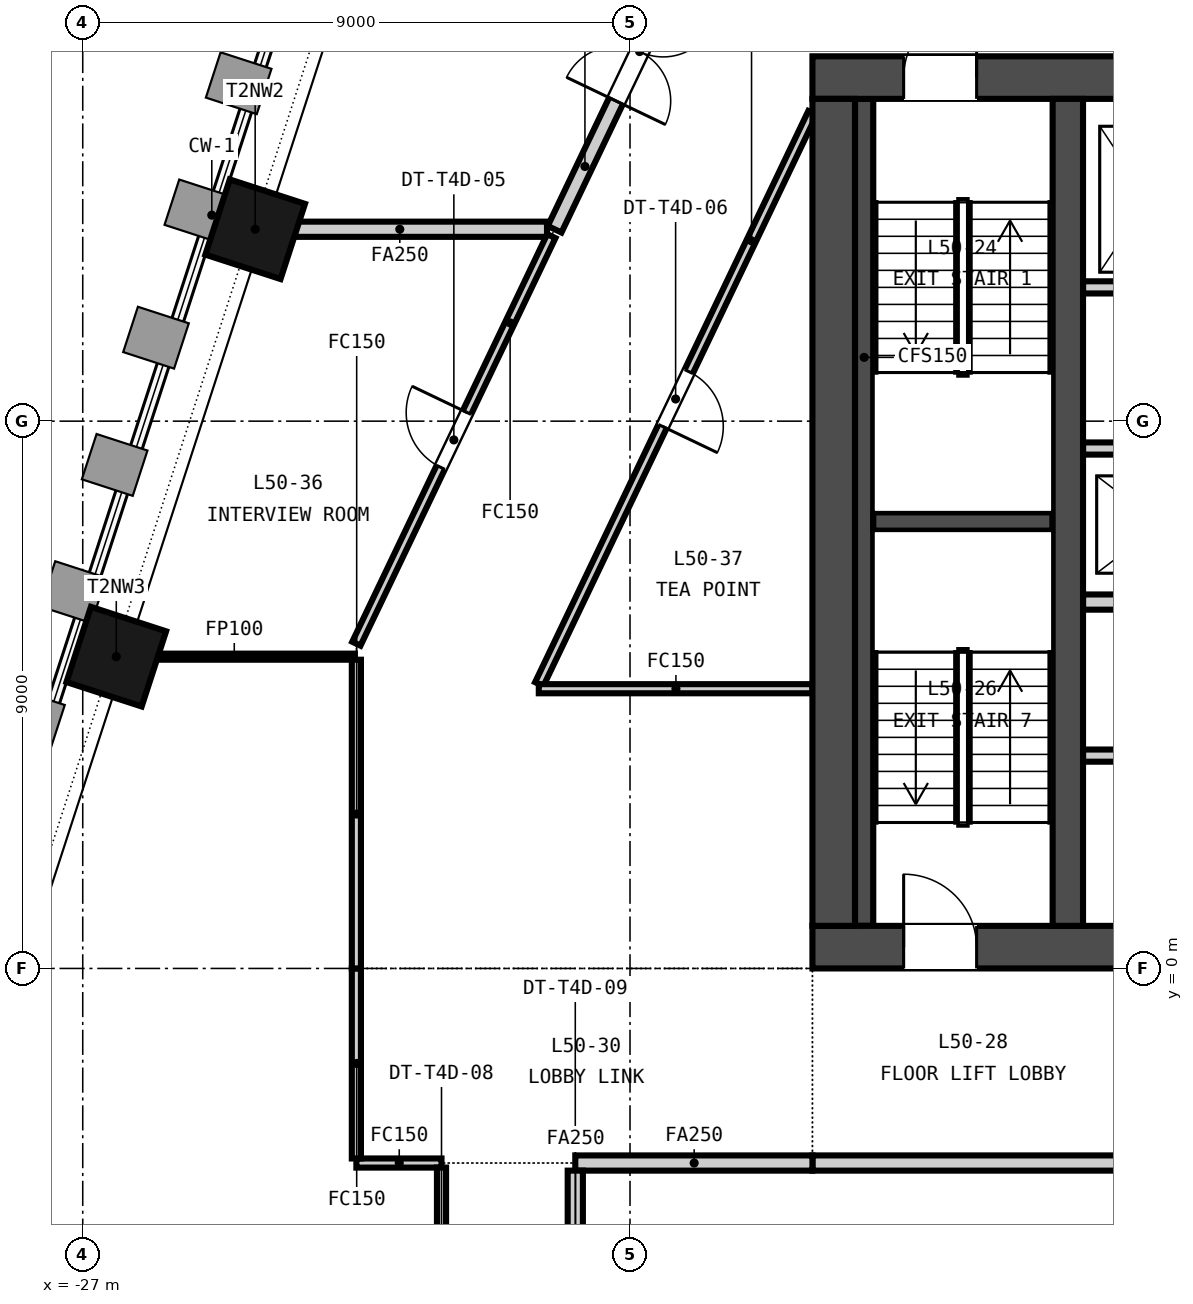
"""IFC4 building model, lengths in metres.
Left out: names, types, materials, properties, quantities, classifications, styles, units other than length and angle.
Written with IfcOpenShell. Run it as: python <this file> out.ifc"""

import sys

from ifc_helpers import new_model, si_unit, direction, frame, frame_2d, origin, origin_2d, place, context, subcontext, project, spatial, rectangle, extrude, element, fill, save


model = new_model("IFC4")
c1 = context("Model", 3, precision=1e-05, world=origin(), true_north=direction((0.0, 1.0)))
c2 = subcontext(c1, "Body", "Model", "MODEL_VIEW")
j1 = project(units=[si_unit("LENGTHUNIT", "METRE"), si_unit("PLANEANGLEUNIT", "RADIAN")], contexts=[c1])
p1 = place(None, origin())
s1 = spatial("IfcSite", under=j1, at=p1, CompositionType="ELEMENT")
p2 = place(p1, origin())
s2 = spatial("IfcBuilding", under=s1, at=p2, CompositionType="ELEMENT")
p3 = place(p2, frame((0.0, 0.0, 200.0)))
s3 = spatial("IfcBuildingStorey", under=s2, at=p3, CompositionType="ELEMENT", Elevation=200.0)
p4 = place(p3, frame((-15.0, 0.35, -0.15), z_axis=(0.0, 0.0, 1.0), x_axis=(1.0, 0.0, 0.0)))
e1 = element("IfcWall", 1, at=p4, inside=s3, PredefinedType="SOLIDWALL", context=c2, shape_type="SweptSolid", body=[
    extrude(rectangle(XDim=30.0, YDim=0.7, at=frame_2d((15.0, 0.0))), origin(), (0.0, 0.0, 1.0), 3.65),
])
p5 = place(p4, frame((5.8, 0.0, 0.15)))
e2 = element("IfcOpeningElement", 2, at=p5, cuts=e1, PredefinedType="OPENING", context=c2, shape_type="SweptSolid", body=[
    extrude(rectangle(XDim=2.4, YDim=2.4, at=frame_2d((1.2, 1.2))), frame((0.0, 0.36, 0.0), z_axis=(0.0, -1.0, 0.0), x_axis=(1.0, 0.0, 0.0)), (0.0, 0.0, 1.0), 0.72),
])
p6 = place(p4, frame((13.8, 0.0, 0.15)))
e3 = element("IfcOpeningElement", 3, at=p6, cuts=e1, PredefinedType="OPENING", context=c2, shape_type="SweptSolid", body=[
    extrude(rectangle(XDim=2.4, YDim=2.4, at=frame_2d((1.2, 1.2))), frame((0.0, 0.36, 0.0), z_axis=(0.0, -1.0, 0.0), x_axis=(1.0, 0.0, 0.0)), (0.0, 0.0, 1.0), 0.72),
])
p7 = place(p4, frame((21.8, 0.0, 0.15)))
e4 = element("IfcOpeningElement", 4, at=p7, cuts=e1, PredefinedType="OPENING", context=c2, shape_type="SweptSolid", body=[
    extrude(rectangle(XDim=2.4, YDim=2.4, at=frame_2d((1.2, 1.2))), frame((0.0, 0.36, 0.0), z_axis=(0.0, -1.0, 0.0), x_axis=(1.0, 0.0, 0.0)), (0.0, 0.0, 1.0), 0.72),
])
p8 = place(p4, frame((1.5, 0.0, 0.15)))
e5 = element("IfcOpeningElement", 5, at=p8, cuts=e1, PredefinedType="OPENING", context=c2, shape_type="SweptSolid", body=[
    extrude(rectangle(XDim=1.2, YDim=2.1, at=frame_2d((0.6, 1.05))), frame((0.0, 0.36, 0.0), z_axis=(0.0, -1.0, 0.0), x_axis=(1.0, 0.0, 0.0)), (0.0, 0.0, 1.0), 0.72),
])
p9 = place(p4, frame((27.3, 0.0, 0.15)))
e6 = element("IfcOpeningElement", 6, at=p9, cuts=e1, PredefinedType="OPENING", context=c2, shape_type="SweptSolid", body=[
    extrude(rectangle(XDim=1.2, YDim=2.1, at=frame_2d((0.6, 1.05))), frame((0.0, 0.36, 0.0), z_axis=(0.0, -1.0, 0.0), x_axis=(1.0, 0.0, 0.0)), (0.0, 0.0, 1.0), 0.72),
])
p10 = place(p3, frame((-15.0, 14.65, -0.15), z_axis=(0.0, 0.0, 1.0), x_axis=(1.0, 0.0, 0.0)))
e7 = element("IfcWall", 7, at=p10, inside=s3, PredefinedType="SOLIDWALL", context=c2, shape_type="SweptSolid", body=[
    extrude(rectangle(XDim=30.0, YDim=0.7, at=frame_2d((15.0, 0.0))), origin(), (0.0, 0.0, 1.0), 3.65),
])
p11 = place(p10, frame((9.25, 0.0, 0.15)))
e8 = element("IfcOpeningElement", 8, at=p11, cuts=e7, PredefinedType="OPENING", context=c2, shape_type="SweptSolid", body=[
    extrude(rectangle(XDim=1.5, YDim=2.1, at=frame_2d((0.75, 1.05))), frame((0.0, 0.36, 0.0), z_axis=(0.0, -1.0, 0.0), x_axis=(1.0, 0.0, 0.0)), (0.0, 0.0, 1.0), 0.72),
])
p12 = place(p10, frame((19.4, 0.0, 0.15)))
e9 = element("IfcOpeningElement", 9, at=p12, cuts=e7, PredefinedType="OPENING", context=c2, shape_type="SweptSolid", body=[
    extrude(rectangle(XDim=1.5, YDim=2.1, at=frame_2d((0.75, 1.05))), frame((0.0, 0.36, 0.0), z_axis=(0.0, -1.0, 0.0), x_axis=(1.0, 0.0, 0.0)), (0.0, 0.0, 1.0), 0.72),
])
p13 = place(p10, frame((1.5, 0.0, 0.15)))
e10 = element("IfcOpeningElement", 10, at=p13, cuts=e7, PredefinedType="OPENING", context=c2, shape_type="SweptSolid", body=[
    extrude(rectangle(XDim=1.2, YDim=2.1, at=frame_2d((0.6, 1.05))), frame((0.0, 0.36, 0.0), z_axis=(0.0, -1.0, 0.0), x_axis=(1.0, 0.0, 0.0)), (0.0, 0.0, 1.0), 0.72),
])
p14 = place(p10, frame((27.3, 0.0, 0.15)))
e11 = element("IfcOpeningElement", 11, at=p14, cuts=e7, PredefinedType="OPENING", context=c2, shape_type="SweptSolid", body=[
    extrude(rectangle(XDim=1.2, YDim=2.1, at=frame_2d((0.6, 1.05))), frame((0.0, 0.36, 0.0), z_axis=(0.0, -1.0, 0.0), x_axis=(1.0, 0.0, 0.0)), (0.0, 0.0, 1.0), 0.72),
])
p15 = place(p3, frame((-14.65, 0.7, -0.15), z_axis=(0.0, 0.0, 1.0), x_axis=(0.0, 1.0, 0.0)))
e12 = element("IfcWall", 12, at=p15, inside=s3, PredefinedType="SOLIDWALL", context=c2, shape_type="SweptSolid", body=[
    extrude(rectangle(XDim=13.6, YDim=0.7, at=frame_2d((6.8, 0.0))), origin(), (0.0, 0.0, 1.0), 3.65),
])
p16 = place(p3, frame((-10.8, 0.7, -0.15), z_axis=(0.0, 0.0, 1.0), x_axis=(0.0, 1.0, 0.0)))
e13 = element("IfcWall", 13, at=p16, inside=s3, PredefinedType="SOLIDWALL", context=c2, shape_type="SweptSolid", body=[
    extrude(rectangle(XDim=13.6, YDim=0.5, at=frame_2d((6.8, 0.0))), origin(), (0.0, 0.0, 1.0), 3.65),
])
for number, where, z_axis, x_axis in (
    (14, (-24.164, 12.156, -0.15), (0.0, 0.0, 1.0), (-0.309, -0.951, 0.0)),
    (15, (-26.448, 5.127, -0.15), (0.0, 0.0, 1.0), (-0.309, -0.951, 0.0)),
):
    element("IfcColumn", number, at=place(p3, frame(where, z_axis=z_axis, x_axis=x_axis)), inside=s3, PredefinedType="COLUMN", context=c2, shape_type="SweptSolid", body=[
        extrude(rectangle(XDim=1.3, YDim=1.3, at=origin_2d()), origin(), (0.0, 0.0, 1.0), 3.65),
    ])
p17 = place(p3, frame((-10.55, 3.5, 0.0), z_axis=(0.0, 0.0, 1.0), x_axis=(1.0, 0.0, 0.0)))
e16 = element("IfcWall", 16, at=p17, inside=s3, PredefinedType="PARTITIONING", context=c2, shape_type="SweptSolid", body=[
    extrude(rectangle(XDim=21.1, YDim=0.2, at=frame_2d((10.55, 0.0))), origin(), (0.0, 0.0, 1.0), 3.5),
])
p18 = place(p17, frame((1.262, 0.0, 0.0)))
e17 = element("IfcOpeningElement", 17, at=p18, cuts=e16, PredefinedType="OPENING", context=c2, shape_type="SweptSolid", body=[
    extrude(rectangle(XDim=1.0, YDim=2.1, at=frame_2d((0.5, 1.05))), frame((0.0, 0.11, 0.0), z_axis=(0.0, -1.0, 0.0), x_axis=(1.0, 0.0, 0.0)), (0.0, 0.0, 1.0), 0.22),
])
p19 = place(p17, frame((6.0, 0.0, 0.0)))
e18 = element("IfcOpeningElement", 18, at=p19, cuts=e16, PredefinedType="OPENING", context=c2, shape_type="SweptSolid", body=[
    extrude(rectangle(XDim=1.0, YDim=2.1, at=frame_2d((0.5, 1.05))), frame((0.0, 0.11, 0.0), z_axis=(0.0, -1.0, 0.0), x_axis=(1.0, 0.0, 0.0)), (0.0, 0.0, 1.0), 0.22),
])
p20 = place(p17, frame((11.1, 0.0, 0.0)))
e19 = element("IfcOpeningElement", 19, at=p20, cuts=e16, PredefinedType="OPENING", context=c2, shape_type="SweptSolid", body=[
    extrude(rectangle(XDim=1.0, YDim=2.1, at=frame_2d((0.5, 1.05))), frame((0.0, 0.11, 0.0), z_axis=(0.0, -1.0, 0.0), x_axis=(1.0, 0.0, 0.0)), (0.0, 0.0, 1.0), 0.22),
])
p21 = place(p17, frame((16.113, 0.0, 0.0)))
e20 = element("IfcOpeningElement", 20, at=p21, cuts=e16, PredefinedType="OPENING", context=c2, shape_type="SweptSolid", body=[
    extrude(rectangle(XDim=1.0, YDim=2.1, at=frame_2d((0.5, 1.05))), frame((0.0, 0.11, 0.0), z_axis=(0.0, -1.0, 0.0), x_axis=(1.0, 0.0, 0.0)), (0.0, 0.0, 1.0), 0.22),
])
p22 = place(p17, frame((19.9, 0.0, 0.0)))
e21 = element("IfcOpeningElement", 21, at=p22, cuts=e16, PredefinedType="OPENING", context=c2, shape_type="SweptSolid", body=[
    extrude(rectangle(XDim=0.9, YDim=2.1, at=frame_2d((0.45, 1.05))), frame((0.0, 0.11, 0.0), z_axis=(0.0, -1.0, 0.0), x_axis=(1.0, 0.0, 0.0)), (0.0, 0.0, 1.0), 0.22),
])
p23 = place(p3, frame((-10.55, 6.025, 0.0), z_axis=(0.0, 0.0, 1.0), x_axis=(1.0, 0.0, 0.0)))
e22 = element("IfcWall", 22, at=p23, inside=s3, PredefinedType="PARTITIONING", context=c2, shape_type="SweptSolid", body=[
    extrude(rectangle(XDim=21.1, YDim=0.25, at=frame_2d((10.55, 0.0))), origin(), (0.0, 0.0, 1.0), 3.5),
])
p24 = place(p3, frame((-10.55, 8.55, 0.0), z_axis=(0.0, 0.0, 1.0), x_axis=(1.0, 0.0, 0.0)))
e23 = element("IfcWall", 23, at=p24, inside=s3, PredefinedType="PARTITIONING", context=c2, shape_type="SweptSolid", body=[
    extrude(rectangle(XDim=21.1, YDim=0.2, at=frame_2d((10.55, 0.0))), origin(), (0.0, 0.0, 1.0), 3.5),
])
p25 = place(p24, frame((0.675, 0.0, 0.0)))
e24 = element("IfcOpeningElement", 24, at=p25, cuts=e23, PredefinedType="OPENING", context=c2, shape_type="SweptSolid", body=[
    extrude(rectangle(XDim=1.2, YDim=2.1, at=frame_2d((0.6, 1.05))), frame((0.0, 0.11, 0.0), z_axis=(0.0, -1.0, 0.0), x_axis=(1.0, 0.0, 0.0)), (0.0, 0.0, 1.0), 0.22),
])
p26 = place(p24, frame((3.475, 0.0, 0.0)))
e25 = element("IfcOpeningElement", 25, at=p26, cuts=e23, PredefinedType="OPENING", context=c2, shape_type="SweptSolid", body=[
    extrude(rectangle(XDim=1.2, YDim=2.1, at=frame_2d((0.6, 1.05))), frame((0.0, 0.11, 0.0), z_axis=(0.0, -1.0, 0.0), x_axis=(1.0, 0.0, 0.0)), (0.0, 0.0, 1.0), 0.22),
])
p27 = place(p24, frame((6.275, 0.0, 0.0)))
e26 = element("IfcOpeningElement", 26, at=p27, cuts=e23, PredefinedType="OPENING", context=c2, shape_type="SweptSolid", body=[
    extrude(rectangle(XDim=1.2, YDim=2.1, at=frame_2d((0.6, 1.05))), frame((0.0, 0.11, 0.0), z_axis=(0.0, -1.0, 0.0), x_axis=(1.0, 0.0, 0.0)), (0.0, 0.0, 1.0), 0.22),
])
p28 = place(p24, frame((9.075, 0.0, 0.0)))
e27 = element("IfcOpeningElement", 27, at=p28, cuts=e23, PredefinedType="OPENING", context=c2, shape_type="SweptSolid", body=[
    extrude(rectangle(XDim=1.2, YDim=2.1, at=frame_2d((0.6, 1.05))), frame((0.0, 0.11, 0.0), z_axis=(0.0, -1.0, 0.0), x_axis=(1.0, 0.0, 0.0)), (0.0, 0.0, 1.0), 0.22),
])
p29 = place(p24, frame((11.875, 0.0, 0.0)))
e28 = element("IfcOpeningElement", 28, at=p29, cuts=e23, PredefinedType="OPENING", context=c2, shape_type="SweptSolid", body=[
    extrude(rectangle(XDim=1.2, YDim=2.1, at=frame_2d((0.6, 1.05))), frame((0.0, 0.11, 0.0), z_axis=(0.0, -1.0, 0.0), x_axis=(1.0, 0.0, 0.0)), (0.0, 0.0, 1.0), 0.22),
])
p30 = place(p24, frame((14.675, 0.0, 0.0)))
e29 = element("IfcOpeningElement", 29, at=p30, cuts=e23, PredefinedType="OPENING", context=c2, shape_type="SweptSolid", body=[
    extrude(rectangle(XDim=1.2, YDim=2.1, at=frame_2d((0.6, 1.05))), frame((0.0, 0.11, 0.0), z_axis=(0.0, -1.0, 0.0), x_axis=(1.0, 0.0, 0.0)), (0.0, 0.0, 1.0), 0.22),
])
p31 = place(p24, frame((17.475, 0.0, 0.0)))
e30 = element("IfcOpeningElement", 30, at=p31, cuts=e23, PredefinedType="OPENING", context=c2, shape_type="SweptSolid", body=[
    extrude(rectangle(XDim=1.2, YDim=2.1, at=frame_2d((0.6, 1.05))), frame((0.0, 0.11, 0.0), z_axis=(0.0, -1.0, 0.0), x_axis=(1.0, 0.0, 0.0)), (0.0, 0.0, 1.0), 0.22),
])
p32 = place(p24, frame((19.9, 0.0, 0.0)))
e31 = element("IfcOpeningElement", 31, at=p32, cuts=e23, PredefinedType="OPENING", context=c2, shape_type="SweptSolid", body=[
    extrude(rectangle(XDim=0.9, YDim=2.1, at=frame_2d((0.45, 1.05))), frame((0.0, 0.11, 0.0), z_axis=(0.0, -1.0, 0.0), x_axis=(1.0, 0.0, 0.0)), (0.0, 0.0, 1.0), 0.22),
])
p33 = place(p3, frame((-10.55, 11.2, 0.0), z_axis=(0.0, 0.0, 1.0), x_axis=(1.0, 0.0, 0.0)))
e32 = element("IfcWall", 32, at=p33, inside=s3, PredefinedType="PARTITIONING", context=c2, shape_type="SweptSolid", body=[
    extrude(rectangle(XDim=4.8, YDim=0.2, at=frame_2d((2.4, 0.0))), origin(), (0.0, 0.0, 1.0), 3.5),
])
p34 = place(p33, frame((0.525, 0.0, 0.0)))
e33 = element("IfcOpeningElement", 33, at=p34, cuts=e32, PredefinedType="OPENING", context=c2, shape_type="SweptSolid", body=[
    extrude(rectangle(XDim=1.1, YDim=2.1, at=frame_2d((0.55, 1.05))), frame((0.0, 0.11, 0.0), z_axis=(0.0, -1.0, 0.0), x_axis=(1.0, 0.0, 0.0)), (0.0, 0.0, 1.0), 0.22),
])
p35 = place(p33, frame((2.925, 0.0, 0.0)))
e34 = element("IfcOpeningElement", 34, at=p35, cuts=e32, PredefinedType="OPENING", context=c2, shape_type="SweptSolid", body=[
    extrude(rectangle(XDim=1.1, YDim=2.1, at=frame_2d((0.55, 1.05))), frame((0.0, 0.11, 0.0), z_axis=(0.0, -1.0, 0.0), x_axis=(1.0, 0.0, 0.0)), (0.0, 0.0, 1.0), 0.22),
])
p36 = place(p3, frame((-14.0, 7.35, 0.0), z_axis=(0.0, 0.0, 1.0), x_axis=(1.0, 0.0, 0.0)))
e35 = element("IfcWall", 35, at=p36, inside=s3, PredefinedType="SOLIDWALL", context=c2, shape_type="SweptSolid", body=[
    extrude(rectangle(XDim=2.95, YDim=0.3, at=frame_2d((1.475, 0.0))), origin(), (0.0, 0.0, 1.0), 3.5),
])
p37 = place(p3, frame((-14.15, 0.7, 0.0), z_axis=(0.0, 0.0, 1.0), x_axis=(0.0, 1.0, 0.0)))
e36 = element("IfcWall", 36, at=p37, inside=s3, PredefinedType="SOLIDWALL", context=c2, shape_type="SweptSolid", body=[
    extrude(rectangle(XDim=13.6, YDim=0.3, at=frame_2d((6.8, 0.0))), origin(), (0.0, 0.0, 1.0), 3.5),
])
p38 = place(p3, frame((7.645, -3.2, 0.0), z_axis=(0.0, 0.0, 1.0), x_axis=(-1.0, 0.0, 0.0)))
e37 = element("IfcWall", 37, at=p38, inside=s3, PredefinedType="PARTITIONING", context=c2, shape_type="SweptSolid", body=[
    extrude(rectangle(XDim=22.645, YDim=0.25, at=frame_2d((11.323, 0.0))), origin(), (0.0, 0.0, 1.0), 2.741),
])
p39 = place(p38, frame((10.423, 0.0, 0.0)))
e38 = element("IfcOpeningElement", 38, at=p39, cuts=e37, PredefinedType="OPENING", context=c2, shape_type="SweptSolid", body=[
    extrude(rectangle(XDim=1.8, YDim=2.1, at=frame_2d((0.9, 1.05))), frame((0.0, 0.135, 0.0), z_axis=(0.0, -1.0, 0.0), x_axis=(1.0, 0.0, 0.0)), (0.0, 0.0, 1.0), 0.27),
])
p40 = place(p3, frame((-21.1, -3.2, 0.0), z_axis=(0.0, 0.0, 1.0), x_axis=(-1.0, 0.0, 0.0)))
e39 = element("IfcWall", 39, at=p40, inside=s3, PredefinedType="PARTITIONING", context=c2, shape_type="SweptSolid", body=[
    extrude(rectangle(XDim=1.4, YDim=0.15, at=frame_2d((0.7, 0.0))), origin(), (0.0, 0.0, 1.0), 2.741),
])
p41 = place(p3, frame((-15.0, -3.2, 0.0), z_axis=(0.0, 0.0, 1.0), x_axis=(-1.0, 0.0, 0.0)))
e40 = element("IfcWall", 40, at=p41, inside=s3, PredefinedType="PARTITIONING", context=c2, shape_type="SweptSolid", body=[
    extrude(rectangle(XDim=3.9, YDim=0.25, at=frame_2d((1.95, 0.0))), origin(), (0.0, 0.0, 1.0), 2.741),
])
p42 = place(p3, frame((-15.0, 14.069, 0.0), z_axis=(0.0, 0.0, 1.0), x_axis=(-0.43146462293, -0.902129857149, 0.0)))
e41 = element("IfcWall", 41, at=p42, inside=s3, PredefinedType="PARTITIONING", context=c2, shape_type="SweptSolid", body=[
    extrude(rectangle(XDim=10.413, YDim=0.15, at=frame_2d((5.207, 0.0))), origin(), (0.0, 0.0, 1.0), 2.741),
])
p43 = place(p42, frame((4.715, 0.0, 0.0)))
e42 = element("IfcOpeningElement", 42, at=p43, cuts=e41, PredefinedType="OPENING", context=c2, shape_type="SweptSolid", body=[
    extrude(rectangle(XDim=1.0, YDim=2.1, at=frame_2d((0.5, 1.05))), frame((0.0, 0.085, 0.0), z_axis=(0.0, -1.0, 0.0), x_axis=(1.0, 0.0, 0.0)), (0.0, 0.0, 1.0), 0.17),
])
p44 = place(p3, frame((-18.9, -3.325, 0.0), z_axis=(0.0, 0.0, 1.0), x_axis=(0.0, -1.0, 0.0)))
e43 = element("IfcWall", 43, at=p44, inside=s3, PredefinedType="PARTITIONING", context=c2, shape_type="SweptSolid", body=[
    extrude(rectangle(XDim=3.475, YDim=0.25, at=frame_2d((1.738, 0.0))), origin(), (0.0, 0.0, 1.0), 2.741),
])
p45 = place(p3, frame((-19.24, 12.156, 0.0), z_axis=(0.0, 0.0, 1.0), x_axis=(0.43145149658, 0.902136135014, 0.0)))
e44 = element("IfcWall", 44, at=p45, inside=s3, PredefinedType="PARTITIONING", context=c2, shape_type="SweptSolid", body=[
    extrude(rectangle(XDim=6.478, YDim=0.25, at=frame_2d((3.239, 0.0))), origin(), (0.0, 0.0, 1.0), 2.741),
])
p46 = place(p45, frame((2.339, 0.0, 0.0)))
e45 = element("IfcOpeningElement", 45, at=p46, cuts=e44, PredefinedType="OPENING", context=c2, shape_type="SweptSolid", body=[
    extrude(rectangle(XDim=1.8, YDim=2.1, at=frame_2d((0.9, 1.05))), frame((0.0, 0.135, 0.0), z_axis=(0.0, -1.0, 0.0), x_axis=(1.0, 0.0, 0.0)), (0.0, 0.0, 1.0), 0.27),
])
p47 = place(p3, frame((-24.217, 12.156, 0.0), z_axis=(0.0, 0.0, 1.0), x_axis=(1.0, 0.0, 0.0)))
e46 = element("IfcWall", 46, at=p47, inside=s3, PredefinedType="PARTITIONING", context=c2, shape_type="SweptSolid", body=[
    extrude(rectangle(XDim=4.852, YDim=0.25, at=frame_2d((2.426, 0.0))), origin(), (0.0, 0.0, 1.0), 2.741),
])
p48 = place(p3, frame((-22.5, 5.34, 0.0), z_axis=(0.0, 0.0, 1.0), x_axis=(0.431478749841, 0.902123100489, 0.0)))
e47 = element("IfcWall", 47, at=p48, inside=s3, PredefinedType="PARTITIONING", context=c2, shape_type="SweptSolid", body=[
    extrude(rectangle(XDim=7.43, YDim=0.15, at=frame_2d((3.715, 0.0))), origin(), (0.0, 0.0, 1.0), 2.741),
])
p49 = place(p48, frame((3.215, 0.0, 0.0)))
e48 = element("IfcOpeningElement", 48, at=p49, cuts=e47, PredefinedType="OPENING", context=c2, shape_type="SweptSolid", body=[
    extrude(rectangle(XDim=1.0, YDim=2.1, at=frame_2d((0.5, 1.05))), frame((0.0, 0.085, 0.0), z_axis=(0.0, -1.0, 0.0), x_axis=(1.0, 0.0, 0.0)), (0.0, 0.0, 1.0), 0.17),
])
p50 = place(p3, frame((-26.501, 5.127, 0.0), z_axis=(0.0, 0.0, 1.0), x_axis=(1.0, 0.0, 0.0)))
e49 = element("IfcWall", 49, at=p50, inside=s3, PredefinedType="PARTITIONING", context=c2, shape_type="SweptSolid", body=[
    extrude(rectangle(XDim=3.976, YDim=0.1, at=frame_2d((1.988, 0.0))), origin(), (0.0, 0.0, 1.0), 2.741),
])
p51 = place(p3, frame((-19.5, 4.6, 0.0), z_axis=(0.0, 0.0, 1.0), x_axis=(1.0, 0.0, 0.0)))
e50 = element("IfcWall", 50, at=p51, inside=s3, PredefinedType="PARTITIONING", context=c2, shape_type="SweptSolid", body=[
    extrude(rectangle(XDim=4.5, YDim=0.15, at=frame_2d((2.25, 0.0))), origin(), (0.0, 0.0, 1.0), 2.741),
])
p52 = place(p3, frame((-22.5, -3.125, 0.0), z_axis=(0.0, 0.0, 1.0), x_axis=(0.0, 1.0, 0.0)))
e51 = element("IfcWall", 51, at=p52, inside=s3, PredefinedType="PARTITIONING", context=c2, shape_type="SweptSolid", body=[
    extrude(rectangle(XDim=3.125, YDim=0.15, at=frame_2d((1.562, 0.0))), origin(), (0.0, 0.0, 1.0), 2.741),
])
p53 = place(p3, frame((-22.5, 0.0, 0.0), z_axis=(0.0, 0.0, 1.0), x_axis=(0.0, 1.0, 0.0)))
e52 = element("IfcWall", 52, at=p53, inside=s3, PredefinedType="PARTITIONING", context=c2, shape_type="SweptSolid", body=[
    extrude(rectangle(XDim=5.077, YDim=0.15, at=frame_2d((2.539, 0.0))), origin(), (0.0, 0.0, 1.0), 2.741),
])
p54 = place(p3, frame((-21.1, -11.693, 0.0), z_axis=(0.0, 0.0, 1.0), x_axis=(0.0, 1.0, 0.0)))
e53 = element("IfcWall", 53, at=p54, inside=s3, PredefinedType="PARTITIONING", context=c2, shape_type="SweptSolid", body=[
    extrude(rectangle(XDim=8.418, YDim=0.15, at=frame_2d((4.209, 0.0))), origin(), (0.0, 0.0, 1.0), 2.741),
])
p55 = place(p54, frame((3.759, 0.0, 0.0)))
e54 = element("IfcOpeningElement", 54, at=p55, cuts=e53, PredefinedType="OPENING", context=c2, shape_type="SweptSolid", body=[
    extrude(rectangle(XDim=0.9, YDim=2.1, at=frame_2d((0.45, 1.05))), frame((0.0, 0.085, 0.0), z_axis=(0.0, -1.0, 0.0), x_axis=(1.0, 0.0, 0.0)), (0.0, 0.0, 1.0), 0.17),
])
p56 = place(p13, origin())
e55 = element("IfcDoor", 55, at=p56, inside=s3, OperationType="SINGLE_SWING_RIGHT", PredefinedType="DOOR", context=c2, shape_type="SweptSolid", body=[
    extrude(rectangle(XDim=1.2, YDim=2.1, at=frame_2d((0.6, 1.05))), frame((0.0, 0.025, 0.0), z_axis=(0.0, -1.0, 0.0), x_axis=(1.0, 0.0, 0.0)), (0.0, 0.0, 1.0), 0.05),
])
fill(e10, e55)
p57 = place(p8, origin())
e56 = element("IfcDoor", 56, at=p57, inside=s3, OperationType="SINGLE_SWING_LEFT", PredefinedType="DOOR", context=c2, shape_type="SweptSolid", body=[
    extrude(rectangle(XDim=1.2, YDim=2.1, at=frame_2d((0.6, 1.05))), frame((0.0, 0.025, 0.0), z_axis=(0.0, -1.0, 0.0), x_axis=(1.0, 0.0, 0.0)), (0.0, 0.0, 1.0), 0.05),
])
fill(e5, e56)
p58 = place(p46, origin())
e57 = element("IfcDoor", 57, at=p58, inside=s3, OperationType="DOUBLE_DOOR_DOUBLE_SWING", PredefinedType="DOOR", context=c2, shape_type="SweptSolid", body=[
    extrude(rectangle(XDim=1.8, YDim=2.1, at=frame_2d((0.9, 1.05))), frame((0.0, 0.025, 0.0), z_axis=(0.0, -1.0, 0.0), x_axis=(1.0, 0.0, 0.0)), (0.0, 0.0, 1.0), 0.05),
])
fill(e45, e57)
p59 = place(p49, origin())
e58 = element("IfcDoor", 58, at=p59, inside=s3, OperationType="SINGLE_SWING_RIGHT", PredefinedType="DOOR", context=c2, shape_type="SweptSolid", body=[
    extrude(rectangle(XDim=1.0, YDim=2.1, at=frame_2d((0.5, 1.05))), frame((0.0, 0.025, 0.0), z_axis=(0.0, -1.0, 0.0), x_axis=(1.0, 0.0, 0.0)), (0.0, 0.0, 1.0), 0.05),
])
fill(e48, e58)
p60 = place(p43, origin())
e59 = element("IfcDoor", 59, at=p60, inside=s3, OperationType="SINGLE_SWING_RIGHT", PredefinedType="DOOR", context=c2, shape_type="SweptSolid", body=[
    extrude(rectangle(XDim=1.0, YDim=2.1, at=frame_2d((0.5, 1.05))), frame((0.0, 0.025, 0.0), z_axis=(0.0, -1.0, 0.0), x_axis=(1.0, 0.0, 0.0)), (0.0, 0.0, 1.0), 0.05),
])
fill(e42, e59)
save(model, sys.argv[1])
